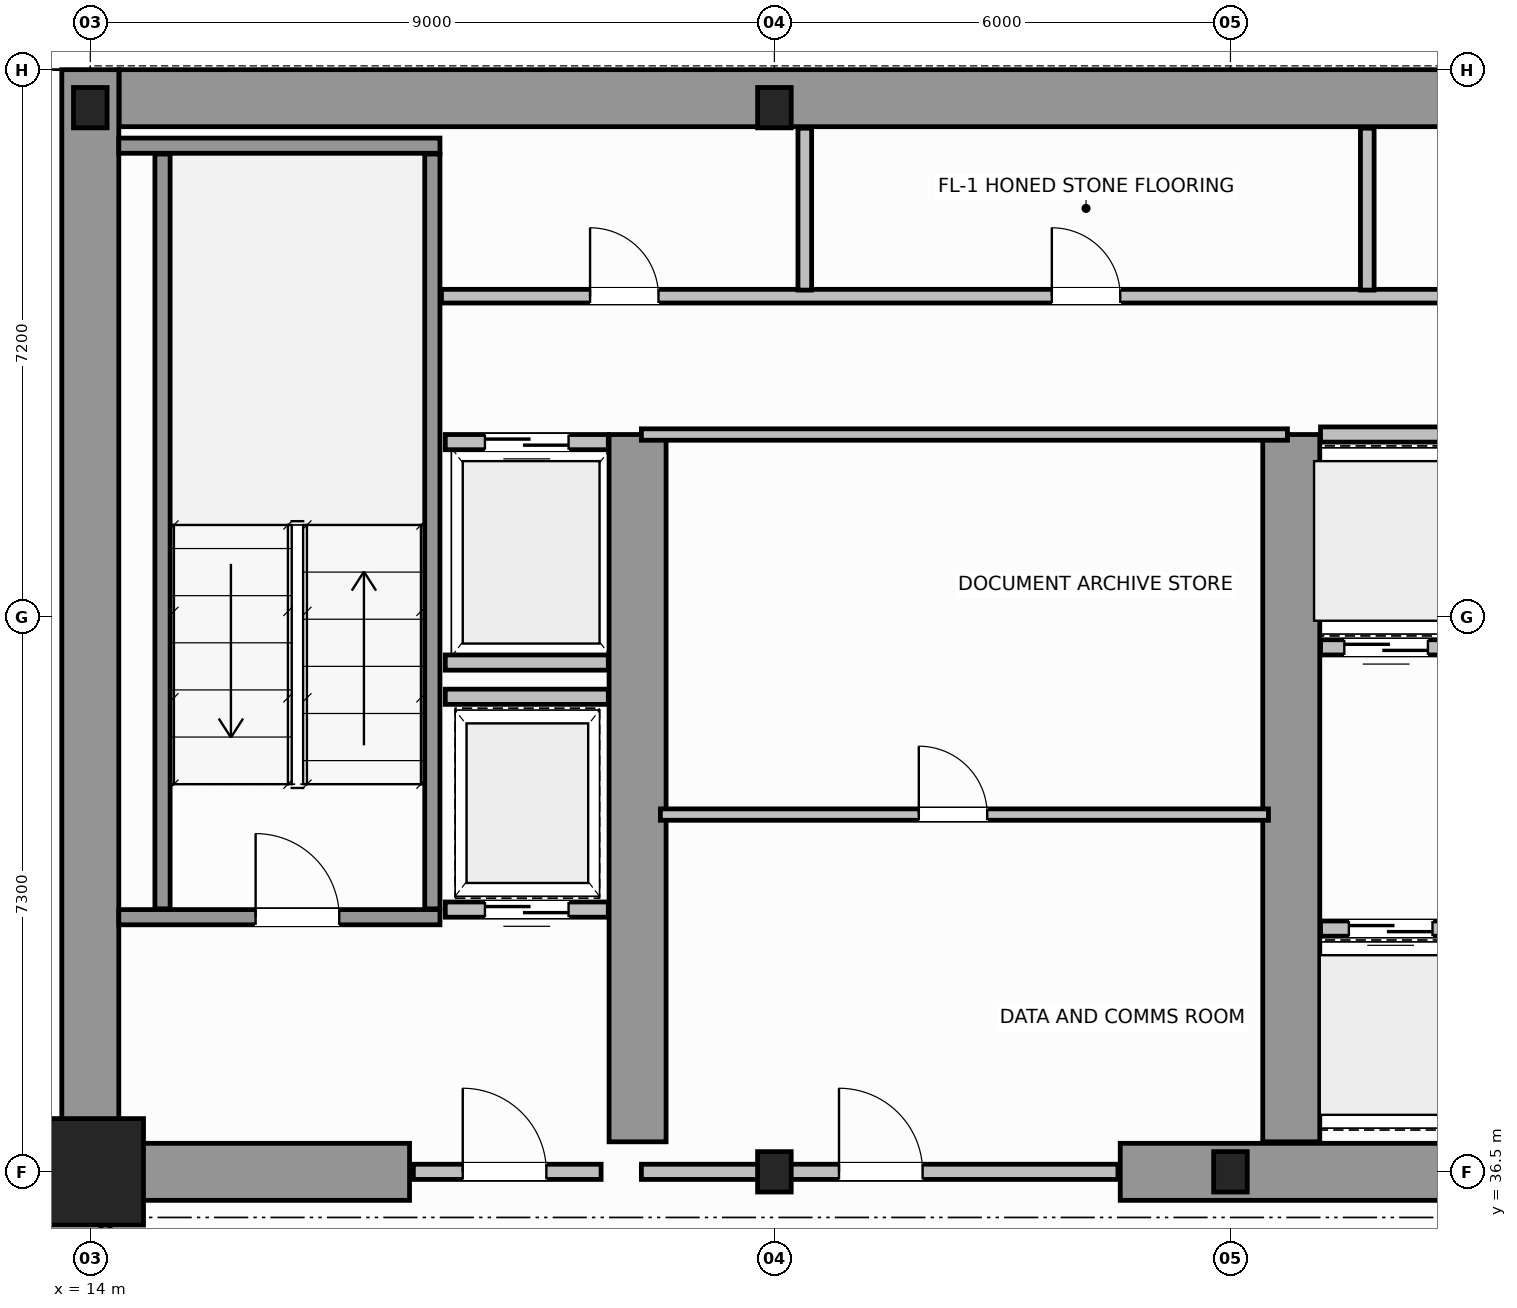
"""IFC4 building model, lengths in metres.
Left out: names, types, materials, properties, quantities, classifications, styles, units other than length and angle.
Written with IfcOpenShell. Run it as: python <this file> out.ifc"""

import sys

from ifc_helpers import new_model, si_unit, direction, frame, frame_2d, origin, origin_2d, place, context, subcontext, project, spatial, rectangle, i_section, extrude, source, transform, mapped, element, fill, save


model = new_model("IFC4")
c1 = context("Model", 3, precision=1e-05, world=origin(), true_north=direction((0.0, 1.0)))
c2 = subcontext(c1, "Body", "Model", "MODEL_VIEW")
j1 = project(units=[si_unit("LENGTHUNIT", "METRE"), si_unit("PLANEANGLEUNIT", "RADIAN")], contexts=[c1])
p1 = place(None, origin())
s1 = spatial("IfcSite", under=j1, at=p1, CompositionType="ELEMENT")
p2 = place(p1, origin())
s2 = spatial("IfcBuilding", under=s1, at=p2, CompositionType="ELEMENT")
p3 = place(p2, frame((0.0, 0.0, 130.0)))
s3 = spatial("IfcBuildingStorey", under=s2, at=p3, CompositionType="ELEMENT", Elevation=130.0)
m1 = source(origin(), c2, "Body", "SweptSolid", [
    extrude(rectangle(XDim=1.4, YDim=1.4, at=origin_2d()), origin(), (0.0, 0.0, 1.0), 3.8),
])
p4 = place(p3, frame((14.0, 36.5, 0.0), z_axis=(0.0, 0.0, 1.0), x_axis=(1.0, 0.0, 0.0)))
e1 = element("IfcColumn", 1, at=p4, inside=s3, PredefinedType="COLUMN", context=c2, shape_type="MappedRepresentation", body=[
    mapped(m1, transform((0.0, 0.0, 0.0), scale=1.0)),
])
m2 = source(origin(), c2, "Body", "SweptSolid", [
    extrude(i_section(OverallWidth=0.442, OverallDepth=0.531, WebThickness=0.065, FlangeThickness=0.076, FilletRadius=0.015, at=origin_2d()), origin(), (0.0, 0.0, 1.0), 3.8),
])
for number, where, z_axis, x_axis in (
    (2, (23.0, 36.5, 0.0), (0.0, 0.0, 1.0), (1.0, 0.0, 0.0)),
    (3, (29.0, 36.5, 0.0), (0.0, 0.0, 1.0), (1.0, 0.0, 0.0)),
    (4, (14.0, 50.5, 0.0), (0.0, 0.0, 1.0), (1.0, 0.0, 0.0)),
    (5, (23.0, 50.5, 0.0), (0.0, 0.0, 1.0), (1.0, 0.0, 0.0)),
):
    element("IfcColumn", number, at=place(p3, frame(where, z_axis=z_axis, x_axis=x_axis)), inside=s3, PredefinedType="COLUMN", context=c2, shape_type="MappedRepresentation", body=[
        mapped(m2, transform((0.0, 0.0, 0.0), scale=1.0)),
    ])
p5 = place(p3, frame((14.379, 50.625, 0.0), z_axis=(0.0, 0.0, 1.0), x_axis=(1.0, 0.0, 0.0)))
e6 = element("IfcWall", 6, at=p5, inside=s3, PredefinedType="SHEAR", context=c2, shape_type="SweptSolid", body=[
    extrude(rectangle(XDim=19.619, YDim=0.75, at=frame_2d((9.81, 0.0))), origin(), (0.0, 0.0, 1.0), 3.8),
])
p6 = place(p3, frame((14.0, 36.5, 0.0), z_axis=(0.0, 0.0, 1.0), x_axis=(0.0, 1.0, 0.0)))
e7 = element("IfcWall", 7, at=p6, inside=s3, PredefinedType="SHEAR", context=c2, shape_type="SweptSolid", body=[
    extrude(rectangle(XDim=14.5, YDim=0.75, at=frame_2d((7.25, 0.0))), origin(), (0.0, 0.0, 1.0), 3.8),
])
p7 = place(p3, frame((14.395, 36.5, 0.0), z_axis=(0.0, 0.0, 1.0), x_axis=(1.0, 0.0, 0.0)))
e8 = element("IfcWall", 8, at=p7, inside=s3, PredefinedType="SHEAR", context=c2, shape_type="SweptSolid", body=[
    extrude(rectangle(XDim=3.805, YDim=0.75, at=frame_2d((1.902, 0.0))), origin(), (0.0, 0.0, 1.0), 2.38),
])
p8 = place(p3, frame((27.55, 36.5, 0.0), z_axis=(0.0, 0.0, 1.0), x_axis=(1.0, 0.0, 0.0)))
e9 = element("IfcWall", 9, at=p8, inside=s3, PredefinedType="SHEAR", context=c2, shape_type="SweptSolid", body=[
    extrude(rectangle(XDim=4.5, YDim=0.75, at=frame_2d((2.25, 0.0))), origin(), (0.0, 0.0, 1.0), 3.8),
])
for number, where, z_axis, x_axis in (
    (10, (21.2, 36.895, 0.0), (0.0, 0.0, 1.0), (0.0, 1.0, 0.0)),
    (11, (29.8, 36.895, 0.0), (0.0, 0.0, 1.0), (0.0, 1.0, 0.0)),
):
    element("IfcWall", number, at=place(p3, frame(where, z_axis=z_axis, x_axis=x_axis)), inside=s3, PredefinedType="SHEAR", context=c2, shape_type="SweptSolid", body=[
        extrude(rectangle(XDim=9.305, YDim=0.75, at=frame_2d((4.652, 0.0))), origin(), (0.0, 0.0, 1.0), 3.8),
    ])
p9 = place(p3, frame((14.375, 39.85, 0.0), z_axis=(0.0, 0.0, 1.0), x_axis=(1.0, 0.0, 0.0)))
e12 = element("IfcWall", 12, at=p9, inside=s3, PredefinedType="SOLIDWALL", context=c2, shape_type="SweptSolid", body=[
    extrude(rectangle(XDim=4.225, YDim=0.2, at=frame_2d((2.113, 0.0))), origin(), (0.0, 0.0, 1.0), 3.8),
])
p10 = place(p9, frame((1.8, 0.0, 0.0)))
e13 = element("IfcOpeningElement", 13, at=p10, cuts=e12, PredefinedType="OPENING", context=c2, shape_type="SweptSolid", body=[
    extrude(rectangle(XDim=1.1, YDim=2.15, at=frame_2d((0.55, 1.075))), frame((0.0, 0.11, 0.0), z_axis=(0.0, -1.0, 0.0), x_axis=(1.0, 0.0, 0.0)), (0.0, 0.0, 1.0), 0.22),
])
p11 = place(p3, frame((14.375, 50.0, 0.0), z_axis=(0.0, 0.0, 1.0), x_axis=(1.0, 0.0, 0.0)))
e14 = element("IfcWall", 14, at=p11, inside=s3, PredefinedType="SOLIDWALL", context=c2, shape_type="SweptSolid", body=[
    extrude(rectangle(XDim=4.225, YDim=0.2, at=frame_2d((2.113, 0.0))), origin(), (0.0, 0.0, 1.0), 3.8),
])
for number, where, z_axis, x_axis in (
    (15, (14.95, 39.96, 0.0), (0.0, 0.0, 1.0), (0.0, 1.0, 0.0)),
    (16, (18.5, 39.96, 0.0), (0.0, 0.0, 1.0), (0.0, 1.0, 0.0)),
):
    element("IfcWall", number, at=place(p3, frame(where, z_axis=z_axis, x_axis=x_axis)), inside=s3, PredefinedType="SOLIDWALL", context=c2, shape_type="SweptSolid", body=[
        extrude(rectangle(XDim=9.93, YDim=0.2, at=frame_2d((4.965, 0.0))), origin(), (0.0, 0.0, 1.0), 3.8),
    ])
p12 = place(p3, frame((18.25, 36.5, 0.0), z_axis=(0.0, 0.0, 1.0), x_axis=(1.0, 0.0, 0.0)))
e17 = element("IfcWall", 17, at=p12, inside=s3, PredefinedType="SOLIDWALL", context=c2, shape_type="SweptSolid", body=[
    extrude(rectangle(XDim=2.47, YDim=0.2, at=frame_2d((1.235, 0.0))), origin(), (0.0, 0.0, 1.0), 2.37),
])
p13 = place(p12, frame((0.65, 0.0, 0.0)))
e18 = element("IfcOpeningElement", 18, at=p13, cuts=e17, PredefinedType="OPENING", context=c2, shape_type="SweptSolid", body=[
    extrude(rectangle(XDim=1.1, YDim=2.15, at=frame_2d((0.55, 1.075))), frame((0.0, 0.11, 0.0), z_axis=(0.0, -1.0, 0.0), x_axis=(1.0, 0.0, 0.0)), (0.0, 0.0, 1.0), 0.22),
])
p14 = place(p3, frame((30.185, 39.7, 0.0), z_axis=(0.0, 0.0, 1.0), x_axis=(1.0, 0.0, 0.0)))
e19 = element("IfcWall", 19, at=p14, inside=s3, PredefinedType="SOLIDWALL", context=c2, shape_type="SweptSolid", body=[
    extrude(rectangle(XDim=1.845, YDim=0.2, at=frame_2d((0.922, 0.0))), origin(), (0.0, 0.0, 1.0), 3.58),
])
p15 = place(p14, frame((0.373, 0.0, 0.0)))
e20 = element("IfcOpeningElement", 20, at=p15, cuts=e19, PredefinedType="OPENING", context=c2, shape_type="SweptSolid", body=[
    extrude(rectangle(XDim=1.1, YDim=2.15, at=frame_2d((0.55, 1.075))), frame((0.0, 0.11, 0.0), z_axis=(0.0, -1.0, 0.0), x_axis=(1.0, 0.0, 0.0)), (0.0, 0.0, 1.0), 0.22),
])
p16 = place(p3, frame((30.185, 43.4, 0.0), z_axis=(0.0, 0.0, 1.0), x_axis=(1.0, 0.0, 0.0)))
e21 = element("IfcWall", 21, at=p16, inside=s3, PredefinedType="SOLIDWALL", context=c2, shape_type="SweptSolid", body=[
    extrude(rectangle(XDim=1.725, YDim=0.2, at=frame_2d((0.862, 0.0))), origin(), (0.0, 0.0, 1.0), 3.58),
])
p17 = place(p16, frame((0.313, 0.0, 0.0)))
e22 = element("IfcOpeningElement", 22, at=p17, cuts=e21, PredefinedType="OPENING", context=c2, shape_type="SweptSolid", body=[
    extrude(rectangle(XDim=1.1, YDim=2.15, at=frame_2d((0.55, 1.075))), frame((0.0, 0.11, 0.0), z_axis=(0.0, -1.0, 0.0), x_axis=(1.0, 0.0, 0.0)), (0.0, 0.0, 1.0), 0.22),
])
p18 = place(p3, frame((30.185, 46.2, 0.0), z_axis=(0.0, 0.0, 1.0), x_axis=(1.0, 0.0, 0.0)))
e23 = element("IfcWall", 23, at=p18, inside=s3, PredefinedType="SOLIDWALL", context=c2, shape_type="SweptSolid", body=[
    extrude(rectangle(XDim=1.725, YDim=0.2, at=frame_2d((0.862, 0.0))), origin(), (0.0, 0.0, 1.0), 3.58),
])
p19 = place(p3, frame((18.67, 46.1, 0.0), z_axis=(0.0, 0.0, 1.0), x_axis=(1.0, 0.0, 0.0)))
e24 = element("IfcWall", 24, at=p19, inside=s3, PredefinedType="SOLIDWALL", context=c2, shape_type="SweptSolid", body=[
    extrude(rectangle(XDim=2.145, YDim=0.2, at=frame_2d((1.073, 0.0))), origin(), (0.0, 0.0, 1.0), 3.58),
])
p20 = place(p19, frame((0.522, 0.0, 0.0)))
e25 = element("IfcOpeningElement", 25, at=p20, cuts=e24, PredefinedType="OPENING", context=c2, shape_type="SweptSolid", body=[
    extrude(rectangle(XDim=1.1, YDim=2.15, at=frame_2d((0.55, 1.075))), frame((0.0, 0.11, 0.0), z_axis=(0.0, -1.0, 0.0), x_axis=(1.0, 0.0, 0.0)), (0.0, 0.0, 1.0), 0.22),
])
p21 = place(p3, frame((18.67, 43.2, 0.0), z_axis=(0.0, 0.0, 1.0), x_axis=(1.0, 0.0, 0.0)))
e26 = element("IfcWall", 26, at=p21, inside=s3, PredefinedType="SOLIDWALL", context=c2, shape_type="SweptSolid", body=[
    extrude(rectangle(XDim=2.145, YDim=0.2, at=frame_2d((1.073, 0.0))), origin(), (0.0, 0.0, 1.0), 3.58),
])
p22 = place(p3, frame((18.67, 39.95, 0.0), z_axis=(0.0, 0.0, 1.0), x_axis=(1.0, 0.0, 0.0)))
e27 = element("IfcWall", 27, at=p22, inside=s3, PredefinedType="SOLIDWALL", context=c2, shape_type="SweptSolid", body=[
    extrude(rectangle(XDim=2.145, YDim=0.2, at=frame_2d((1.073, 0.0))), origin(), (0.0, 0.0, 1.0), 3.58),
])
p23 = place(p22, frame((0.522, 0.0, 0.0)))
e28 = element("IfcOpeningElement", 28, at=p23, cuts=e27, PredefinedType="OPENING", context=c2, shape_type="SweptSolid", body=[
    extrude(rectangle(XDim=1.1, YDim=2.15, at=frame_2d((0.55, 1.075))), frame((0.0, 0.11, 0.0), z_axis=(0.0, -1.0, 0.0), x_axis=(1.0, 0.0, 0.0)), (0.0, 0.0, 1.0), 0.22),
])
p24 = place(p3, frame((18.67, 42.75, 0.0), z_axis=(0.0, 0.0, 1.0), x_axis=(1.0, 0.0, 0.0)))
e29 = element("IfcWall", 29, at=p24, inside=s3, PredefinedType="SOLIDWALL", context=c2, shape_type="SweptSolid", body=[
    extrude(rectangle(XDim=2.145, YDim=0.2, at=frame_2d((1.073, 0.0))), origin(), (0.0, 0.0, 1.0), 3.58),
])
p25 = place(p3, frame((21.25, 36.5, 0.0), z_axis=(0.0, 0.0, 1.0), x_axis=(1.0, 0.0, 0.0)))
e30 = element("IfcWall", 30, at=p25, inside=s3, PredefinedType="SOLIDWALL", context=c2, shape_type="SweptSolid", body=[
    extrude(rectangle(XDim=6.27, YDim=0.2, at=frame_2d((3.135, 0.0))), origin(), (0.0, 0.0, 1.0), 2.37),
])
p26 = place(p25, frame((2.6, 0.0, 0.0)))
e31 = element("IfcOpeningElement", 31, at=p26, cuts=e30, PredefinedType="OPENING", context=c2, shape_type="SweptSolid", body=[
    extrude(rectangle(XDim=1.1, YDim=2.15, at=frame_2d((0.55, 1.075))), frame((0.0, 0.11, 0.0), z_axis=(0.0, -1.0, 0.0), x_axis=(1.0, 0.0, 0.0)), (0.0, 0.0, 1.0), 0.22),
])
p27 = place(p3, frame((21.25, 46.2, 0.0), z_axis=(0.0, 0.0, 1.0), x_axis=(1.0, 0.0, 0.0)))
e32 = element("IfcWall", 32, at=p27, inside=s3, PredefinedType="PARTITIONING", context=c2, shape_type="SweptSolid", body=[
    extrude(rectangle(XDim=8.5, YDim=0.15, at=frame_2d((4.25, 0.0))), origin(), (0.0, 0.0, 1.0), 3.58),
])
p28 = place(p3, frame((21.5, 41.2, 0.0), z_axis=(0.0, 0.0, 1.0), x_axis=(1.0, 0.0, 0.0)))
e33 = element("IfcWall", 33, at=p28, inside=s3, PredefinedType="PARTITIONING", context=c2, shape_type="SweptSolid", body=[
    extrude(rectangle(XDim=8.0, YDim=0.15, at=frame_2d((4.0, 0.0))), origin(), (0.0, 0.0, 1.0), 3.58),
])
p29 = place(p28, frame((3.4, 0.0, 0.0)))
e34 = element("IfcOpeningElement", 34, at=p29, cuts=e33, PredefinedType="OPENING", context=c2, shape_type="SweptSolid", body=[
    extrude(rectangle(XDim=0.9, YDim=2.1, at=frame_2d((0.45, 1.05))), frame((0.0, 0.085, 0.0), z_axis=(0.0, -1.0, 0.0), x_axis=(1.0, 0.0, 0.0)), (0.0, 0.0, 1.0), 0.17),
])
p30 = place(p3, frame((18.62, 48.02, 0.0), z_axis=(0.0, 0.0, 1.0), x_axis=(1.0, 0.0, 0.0)))
e35 = element("IfcWall", 35, at=p30, inside=s3, PredefinedType="PLUMBINGWALL", context=c2, shape_type="SweptSolid", body=[
    extrude(rectangle(XDim=30.76, YDim=0.18, at=frame_2d((15.38, 0.0))), origin(), (0.0, 0.0, 1.0), 3.58),
])
p31 = place(p30, frame((1.955, 0.0, 0.0)))
e36 = element("IfcOpeningElement", 36, at=p31, cuts=e35, PredefinedType="OPENING", context=c2, shape_type="SweptSolid", body=[
    extrude(rectangle(XDim=0.9, YDim=2.15, at=frame_2d((0.45, 1.075))), frame((0.0, 0.1, 0.0), z_axis=(0.0, -1.0, 0.0), x_axis=(1.0, 0.0, 0.0)), (0.0, 0.0, 1.0), 0.2),
])
p32 = place(p30, frame((8.03, 0.0, 0.0)))
e37 = element("IfcOpeningElement", 37, at=p32, cuts=e35, PredefinedType="OPENING", context=c2, shape_type="SweptSolid", body=[
    extrude(rectangle(XDim=0.9, YDim=2.15, at=frame_2d((0.45, 1.075))), frame((0.0, 0.1, 0.0), z_axis=(0.0, -1.0, 0.0), x_axis=(1.0, 0.0, 0.0)), (0.0, 0.0, 1.0), 0.2),
])
p33 = place(p30, frame((16.93, 0.0, 0.0)))
e38 = element("IfcOpeningElement", 38, at=p33, cuts=e35, PredefinedType="OPENING", context=c2, shape_type="SweptSolid", body=[
    extrude(rectangle(XDim=0.9, YDim=2.15, at=frame_2d((0.45, 1.075))), frame((0.0, 0.1, 0.0), z_axis=(0.0, -1.0, 0.0), x_axis=(1.0, 0.0, 0.0)), (0.0, 0.0, 1.0), 0.2),
])
p34 = place(p30, frame((26.205, 0.0, 0.0)))
e39 = element("IfcOpeningElement", 39, at=p34, cuts=e35, PredefinedType="OPENING", context=c2, shape_type="SweptSolid", body=[
    extrude(rectangle(XDim=0.9, YDim=2.15, at=frame_2d((0.45, 1.075))), frame((0.0, 0.1, 0.0), z_axis=(0.0, -1.0, 0.0), x_axis=(1.0, 0.0, 0.0)), (0.0, 0.0, 1.0), 0.2),
])
for number, where, z_axis, x_axis in (
    (40, (23.4, 48.1, 0.0), (0.0, 0.0, 1.0), (0.0, 1.0, 0.0)),
    (41, (30.8, 48.1, 0.0), (0.0, 0.0, 1.0), (0.0, 1.0, 0.0)),
):
    element("IfcWall", number, at=place(p3, frame(where, z_axis=z_axis, x_axis=x_axis)), inside=s3, PredefinedType="PLUMBINGWALL", context=c2, shape_type="SweptSolid", body=[
        extrude(rectangle(XDim=2.13, YDim=0.18, at=frame_2d((1.065, 0.0))), origin(), (0.0, 0.0, 1.0), 3.58),
    ])
p35 = place(p3, frame((14.2, 34.16, 0.0), z_axis=(0.0, 0.0, 1.0), x_axis=(0.0, 1.0, 0.0)))
e42 = element("IfcWall", 42, at=p35, inside=s3, PredefinedType="PARTITIONING", context=c2, shape_type="SweptSolid", body=[
    extrude(rectangle(XDim=2.28, YDim=0.12, at=frame_2d((1.14, 0.0))), origin(), (0.0, 0.0, 1.0), 3.58),
])
p36 = place(p35, frame((0.3, 0.0, 0.0)))
e43 = element("IfcOpeningElement", 43, at=p36, cuts=e42, PredefinedType="OPENING", context=c2, shape_type="SweptSolid", body=[
    extrude(rectangle(XDim=0.9, YDim=2.15, at=frame_2d((0.45, 1.075))), frame((0.0, 0.07, 0.0), z_axis=(0.0, -1.0, 0.0), x_axis=(1.0, 0.0, 0.0)), (0.0, 0.0, 1.0), 0.14),
])
m3 = source(origin(), c2, "Body", "SweptSolid", [
    extrude(rectangle(XDim=1.1, YDim=2.15, at=frame_2d((0.55, 1.075))), frame((0.0, 0.025, 0.0), z_axis=(0.0, -1.0, 0.0), x_axis=(1.0, 0.0, 0.0)), (0.0, 0.0, 1.0), 0.05),
])
p37 = place(p10, origin())
e44 = element("IfcDoor", 44, at=p37, inside=s3, OperationType="SINGLE_SWING_LEFT", PredefinedType="DOOR", context=c2, shape_type="MappedRepresentation", body=[
    mapped(m3, transform((0.0, 0.0, 0.0), scale=1.0)),
])
fill(e13, e44)
p38 = place(p13, origin())
e45 = element("IfcDoor", 45, at=p38, inside=s3, OperationType="SINGLE_SWING_RIGHT", PredefinedType="DOOR", context=c2, shape_type="MappedRepresentation", body=[
    mapped(m3, transform((0.0, 0.0, 0.0), scale=1.0)),
])
fill(e18, e45)
p39 = place(p15, origin())
e46 = element("IfcDoor", 46, at=p39, inside=s3, OperationType="DOUBLE_DOOR_SLIDING", PredefinedType="DOOR", context=c2, shape_type="MappedRepresentation", body=[
    mapped(m3, transform((0.0, 0.0, 0.0), scale=1.0)),
])
fill(e20, e46)
p40 = place(p17, origin())
e47 = element("IfcDoor", 47, at=p40, inside=s3, OperationType="DOUBLE_DOOR_SLIDING", PredefinedType="DOOR", context=c2, shape_type="MappedRepresentation", body=[
    mapped(m3, transform((0.0, 0.0, 0.0), scale=1.0)),
])
fill(e22, e47)
p41 = place(p20, origin())
e48 = element("IfcDoor", 48, at=p41, inside=s3, OperationType="DOUBLE_DOOR_SLIDING", PredefinedType="DOOR", context=c2, shape_type="MappedRepresentation", body=[
    mapped(m3, transform((0.0, 0.0, 0.0), scale=1.0)),
])
fill(e25, e48)
p42 = place(p23, origin())
e49 = element("IfcDoor", 49, at=p42, inside=s3, OperationType="DOUBLE_DOOR_SLIDING", PredefinedType="DOOR", context=c2, shape_type="MappedRepresentation", body=[
    mapped(m3, transform((0.0, 0.0, 0.0), scale=1.0)),
])
fill(e28, e49)
p43 = place(p26, origin())
e50 = element("IfcDoor", 50, at=p43, inside=s3, OperationType="SINGLE_SWING_LEFT", PredefinedType="DOOR", context=c2, shape_type="MappedRepresentation", body=[
    mapped(m3, transform((0.0, 0.0, 0.0), scale=1.0)),
])
fill(e31, e50)
m4 = source(origin(), c2, "Body", "SweptSolid", [
    extrude(rectangle(XDim=0.9, YDim=2.1, at=frame_2d((0.45, 1.05))), frame((0.0, 0.025, 0.0), z_axis=(0.0, -1.0, 0.0), x_axis=(1.0, 0.0, 0.0)), (0.0, 0.0, 1.0), 0.05),
])
p44 = place(p29, origin())
e51 = element("IfcDoor", 51, at=p44, inside=s3, OperationType="SINGLE_SWING_RIGHT", PredefinedType="DOOR", context=c2, shape_type="MappedRepresentation", body=[
    mapped(m4, transform((0.0, 0.0, 0.0), scale=1.0)),
])
fill(e34, e51)
m5 = source(origin(), c2, "Body", "SweptSolid", [
    extrude(rectangle(XDim=0.9, YDim=2.15, at=frame_2d((0.45, 1.075))), frame((0.0, 0.025, 0.0), z_axis=(0.0, -1.0, 0.0), x_axis=(1.0, 0.0, 0.0)), (0.0, 0.0, 1.0), 0.05),
])
p45 = place(p31, origin())
e52 = element("IfcDoor", 52, at=p45, inside=s3, OperationType="SINGLE_SWING_LEFT", PredefinedType="DOOR", context=c2, shape_type="MappedRepresentation", body=[
    mapped(m5, transform((0.0, 0.0, 0.0), scale=1.0)),
])
fill(e36, e52)
p46 = place(p32, origin())
e53 = element("IfcDoor", 53, at=p46, inside=s3, OperationType="SINGLE_SWING_RIGHT", PredefinedType="DOOR", context=c2, shape_type="MappedRepresentation", body=[
    mapped(m5, transform((0.0, 0.0, 0.0), scale=1.0)),
])
fill(e37, e53)
save(model, sys.argv[1])
